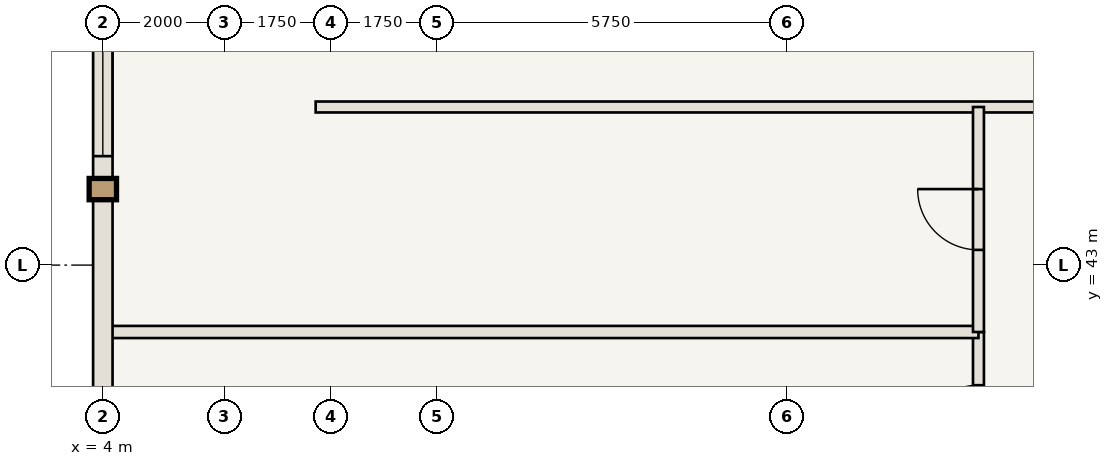
"""IFC4 building model, lengths in metres.
Left out: names, types, materials, properties, quantities, classifications, styles, units other than length and angle.
Written with IfcOpenShell. Run it as: python <this file> out.ifc"""

import sys

from ifc_helpers import new_model, si_unit, direction, frame, frame_2d, origin, place, context, subcontext, project, spatial, rectangle, extrude, element, fill, save


model = new_model("IFC4")
c1 = context("Model", 3, precision=1e-05, world=origin(), true_north=direction((0.0, 1.0)))
c2 = subcontext(c1, "Body", "Model", "MODEL_VIEW")
j1 = project(units=[si_unit("LENGTHUNIT", "METRE"), si_unit("PLANEANGLEUNIT", "RADIAN")], contexts=[c1])
p1 = place(None, origin())
s1 = spatial("IfcSite", under=j1, at=p1, CompositionType="ELEMENT")
p2 = place(p1, origin())
s2 = spatial("IfcBuilding", under=s1, at=p2, CompositionType="ELEMENT")
p3 = place(p2, frame((0.0, 0.0, 45.85)))
s3 = spatial("IfcBuildingStorey", under=s2, at=p3, CompositionType="ELEMENT", Elevation=45.85)
p4 = place(p3, frame((7.5, 45.6, 0.0), z_axis=(0.0, 0.0, 1.0), x_axis=(1.0, 0.0, 0.0)))
e1 = element("IfcWall", 1, at=p4, inside=s3, PredefinedType="STANDARD", context=c2, shape_type="SweptSolid", body=[
    extrude(rectangle(XDim=16.6, YDim=0.18, at=frame_2d((8.3, 0.0))), origin(), (0.0, 0.0, 1.0), 3.32),
])
p5 = place(p4, frame((11.825, 0.0, 0.0)))
e2 = element("IfcOpeningElement", 2, at=p5, cuts=e1, PredefinedType="OPENING", context=c2, shape_type="SweptSolid", body=[
    extrude(rectangle(XDim=1.0, YDim=2.15, at=frame_2d((0.5, 1.075))), frame((0.0, 0.1, 0.0), z_axis=(0.0, -1.0, 0.0), x_axis=(1.0, 0.0, 0.0)), (0.0, 0.0, 1.0), 0.2),
])
p6 = place(p3, frame((18.4, 37.3, 0.0), z_axis=(0.0, 0.0, 1.0), x_axis=(0.0, 1.0, 0.0)))
e3 = element("IfcWall", 3, at=p6, inside=s3, PredefinedType="STANDARD", context=c2, shape_type="SweptSolid", body=[
    extrude(rectangle(XDim=4.6, YDim=0.18, at=frame_2d((2.3, 0.0))), origin(), (0.0, 0.0, 1.0), 3.32),
])
p7 = place(p6, frame((2.725, 0.0, 0.0)))
e4 = element("IfcOpeningElement", 4, at=p7, cuts=e3, PredefinedType="OPENING", context=c2, shape_type="SweptSolid", body=[
    extrude(rectangle(XDim=1.0, YDim=2.15, at=frame_2d((0.5, 1.075))), frame((0.0, 0.1, 0.0), z_axis=(0.0, -1.0, 0.0), x_axis=(1.0, 0.0, 0.0)), (0.0, 0.0, 1.0), 0.2),
])
p8 = place(p3, frame((4.06, 41.9, 0.0), z_axis=(0.0, 0.0, 1.0), x_axis=(1.0, 0.0, 0.0)))
e5 = element("IfcWall", 5, at=p8, inside=s3, PredefinedType="STANDARD", context=c2, shape_type="SweptSolid", body=[
    extrude(rectangle(XDim=14.34, YDim=0.2, at=frame_2d((7.17, 0.0))), origin(), (0.0, 0.0, 1.0), 3.32),
])
p9 = place(p3, frame((18.4, 41.9, 0.0), z_axis=(0.0, 0.0, 1.0), x_axis=(0.0, 1.0, 0.0)))
e6 = element("IfcWall", 6, at=p9, inside=s3, PredefinedType="STANDARD", context=c2, shape_type="SweptSolid", body=[
    extrude(rectangle(XDim=3.7, YDim=0.18, at=frame_2d((1.85, 0.0))), origin(), (0.0, 0.0, 1.0), 3.32),
])
p10 = place(p9, frame((1.35, 0.0, 0.0)))
e7 = element("IfcOpeningElement", 7, at=p10, cuts=e6, PredefinedType="OPENING", context=c2, shape_type="SweptSolid", body=[
    extrude(rectangle(XDim=1.0, YDim=2.15, at=frame_2d((0.5, 1.075))), frame((0.0, 0.1, 0.0), z_axis=(0.0, -1.0, 0.0), x_axis=(1.0, 0.0, 0.0)), (0.0, 0.0, 1.0), 0.2),
])
p11 = place(p3, frame((4.0, 40.167, 0.0), z_axis=(0.0, 0.0, 1.0), x_axis=(0.0, 1.0, 0.0)))
e8 = element("IfcWall", 8, at=p11, inside=s3, PredefinedType="USERDEFINED", context=c2, shape_type="SweptSolid", body=[
    extrude(rectangle(XDim=8.167, YDim=0.32, at=frame_2d((4.083, 0.0))), origin(), (0.0, 0.0, 1.0), 2.52),
])
p12 = place(p11, frame((4.625, 0.0, 0.85)))
e9 = element("IfcOpeningElement", 9, at=p12, cuts=e8, PredefinedType="OPENING", context=c2, shape_type="SweptSolid", body=[
    extrude(rectangle(XDim=2.8, YDim=1.47, at=frame_2d((1.4, 0.735))), frame((0.0, 0.17, 0.0), z_axis=(0.0, -1.0, 0.0), x_axis=(1.0, 0.0, 0.0)), (0.0, 0.0, 1.0), 0.34),
])
p13 = place(p7, origin())
e10 = element("IfcDoor", 10, at=p13, inside=s3, OperationType="SINGLE_SWING_LEFT", PredefinedType="DOOR", context=c2, shape_type="SweptSolid", body=[
    extrude(rectangle(XDim=1.0, YDim=2.15, at=frame_2d((0.5, 1.075))), frame((0.0, 0.025, 0.0), z_axis=(0.0, -1.0, 0.0), x_axis=(1.0, 0.0, 0.0)), (0.0, 0.0, 1.0), 0.05),
])
fill(e4, e10)
p14 = place(p10, origin())
e11 = element("IfcDoor", 11, at=p14, inside=s3, OperationType="SINGLE_SWING_RIGHT", PredefinedType="DOOR", context=c2, shape_type="SweptSolid", body=[
    extrude(rectangle(XDim=1.0, YDim=2.15, at=frame_2d((0.5, 1.075))), frame((0.0, 0.025, 0.0), z_axis=(0.0, -1.0, 0.0), x_axis=(1.0, 0.0, 0.0)), (0.0, 0.0, 1.0), 0.05),
])
fill(e7, e11)
p15 = place(p12, origin())
e12 = element("IfcWindow", 12, at=p15, inside=s3, PartitioningType="SINGLE_PANEL", PredefinedType="WINDOW", context=c2, shape_type="SweptSolid", body=[
    extrude(rectangle(XDim=2.8, YDim=1.47, at=frame_2d((1.4, 0.735))), frame((0.0, 0.03, 0.0), z_axis=(0.0, -1.0, 0.0), x_axis=(1.0, 0.0, 0.0)), (0.0, 0.0, 1.0), 0.06),
])
fill(e9, e12)
save(model, sys.argv[1])
